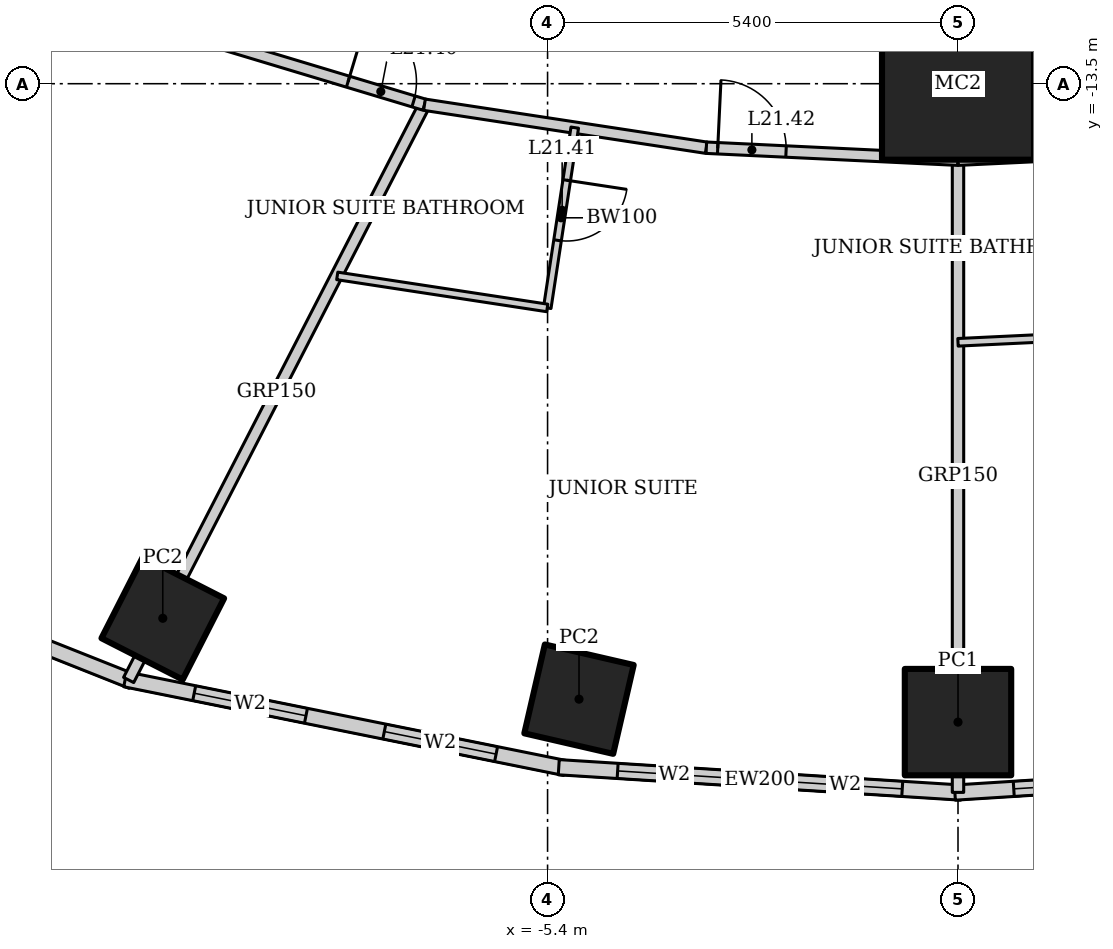
"""IFC4 building model, lengths in metres.
Left out: names, types, materials, properties, quantities, classifications, styles, units other than length and angle.
Written with IfcOpenShell. Run it as: python <this file> out.ifc"""

import sys

from ifc_helpers import new_model, si_unit, direction, frame, frame_2d, origin, origin_2d, place, context, subcontext, project, spatial, rectangle, hollow_rectangle, extrude, element, fill, save


model = new_model("IFC4")
c1 = context("Model", 3, precision=1e-05, world=origin(), true_north=direction((0.0, 1.0)))
c2 = subcontext(c1, "Body", "Model", "MODEL_VIEW")
j1 = project(units=[si_unit("LENGTHUNIT", "METRE"), si_unit("PLANEANGLEUNIT", "RADIAN")], contexts=[c1])
p1 = place(None, origin())
s1 = spatial("IfcSite", under=j1, at=p1, CompositionType="ELEMENT")
p2 = place(p1, origin())
s2 = spatial("IfcBuilding", under=s1, at=p2, CompositionType="ELEMENT")
p3 = place(p2, frame((0.0, 0.0, 91.0)))
s3 = spatial("IfcBuildingStorey", under=s2, at=p3, CompositionType="ELEMENT", Elevation=91.0)
p4 = place(p3, frame((0.0, -13.5, 0.0), z_axis=(0.0, 0.0, 1.0), x_axis=(1.0, 0.0, 0.0)))
e1 = element("IfcColumn", 1, at=p4, inside=s3, PredefinedType="COLUMN", context=c2, shape_type="SweptSolid", body=[
    extrude(hollow_rectangle(XDim=2.0, YDim=2.0, WallThickness=0.17, at=origin_2d()), origin(), (0.0, 0.0, 1.0), 3.6),
])
for number, where, z_axis, x_axis in (
    (2, (-10.463, -20.534, 0.0), (0.0, 0.0, 1.0), (0.454, 0.891, 0.0)),
    (3, (-4.986, -21.598, 0.0), (0.0, 0.0, 1.0), (0.225, 0.974, 0.0)),
):
    element("IfcColumn", number, at=place(p3, frame(where, z_axis=z_axis, x_axis=x_axis)), inside=s3, PredefinedType="COLUMN", context=c2, shape_type="SweptSolid", body=[
        extrude(hollow_rectangle(XDim=1.2, YDim=1.2, WallThickness=0.1, at=origin_2d()), origin(), (0.0, 0.0, 1.0), 3.6),
    ])
p5 = place(p3, frame((0.0, -21.9, 0.0), z_axis=(0.0, 0.0, 1.0), x_axis=(1.0, 0.0, 0.0)))
e4 = element("IfcColumn", 4, at=p5, inside=s3, PredefinedType="COLUMN", context=c2, shape_type="SweptSolid", body=[
    extrude(hollow_rectangle(XDim=1.4, YDim=1.4, WallThickness=0.1, at=origin_2d()), origin(), (0.0, 0.0, 1.0), 3.6),
])
p6 = place(p3, frame((-18.018, -18.523, 0.0), z_axis=(0.0, 0.0, 1.0), x_axis=(0.929358351251, -0.369178892895, 0.0)))
e5 = element("IfcWall", 5, at=p6, inside=s3, PredefinedType="SOLIDWALL", context=c2, shape_type="SweptSolid", body=[
    extrude(rectangle(XDim=7.692, YDim=0.2, at=frame_2d((3.846, 0.0))), origin(), (0.0, 0.0, 1.0), 3.45),
])
p7 = place(p6, frame((1.373, 0.0, 0.5)))
e6 = element("IfcOpeningElement", 6, at=p7, cuts=e5, PredefinedType="OPENING", context=c2, shape_type="SweptSolid", body=[
    extrude(rectangle(XDim=1.5, YDim=2.2, at=frame_2d((0.75, 1.1))), frame((0.0, 0.11, 0.0), z_axis=(0.0, -1.0, 0.0), x_axis=(1.0, 0.0, 0.0)), (0.0, 0.0, 1.0), 0.22),
])
p8 = place(p6, frame((4.819, 0.0, 0.5)))
e7 = element("IfcOpeningElement", 7, at=p8, cuts=e5, PredefinedType="OPENING", context=c2, shape_type="SweptSolid", body=[
    extrude(rectangle(XDim=1.5, YDim=2.2, at=frame_2d((0.75, 1.1))), frame((0.0, 0.11, 0.0), z_axis=(0.0, -1.0, 0.0), x_axis=(1.0, 0.0, 0.0)), (0.0, 0.0, 1.0), 0.22),
])
p9 = place(p3, frame((-10.957, -21.337, 0.0), z_axis=(0.0, 0.0, 1.0), x_axis=(0.980251657452, -0.197754110105, 0.0)))
e8 = element("IfcWall", 8, at=p9, inside=s3, PredefinedType="SOLIDWALL", context=c2, shape_type="SweptSolid", body=[
    extrude(rectangle(XDim=5.904, YDim=0.2, at=frame_2d((2.952, 0.0))), origin(), (0.0, 0.0, 1.0), 3.45),
])
p10 = place(p9, frame((0.926, 0.0, 0.5)))
e9 = element("IfcOpeningElement", 9, at=p10, cuts=e8, PredefinedType="OPENING", context=c2, shape_type="SweptSolid", body=[
    extrude(rectangle(XDim=1.5, YDim=2.2, at=frame_2d((0.75, 1.1))), frame((0.0, 0.11, 0.0), z_axis=(0.0, -1.0, 0.0), x_axis=(1.0, 0.0, 0.0)), (0.0, 0.0, 1.0), 0.22),
])
p11 = place(p9, frame((3.478, 0.0, 0.5)))
e10 = element("IfcOpeningElement", 10, at=p11, cuts=e8, PredefinedType="OPENING", context=c2, shape_type="SweptSolid", body=[
    extrude(rectangle(XDim=1.5, YDim=2.2, at=frame_2d((0.75, 1.1))), frame((0.0, 0.11, 0.0), z_axis=(0.0, -1.0, 0.0), x_axis=(1.0, 0.0, 0.0)), (0.0, 0.0, 1.0), 0.22),
])
p12 = place(p3, frame((-5.253, -22.493, 0.0), z_axis=(0.0, 0.0, 1.0), x_axis=(0.998018582375, -0.062919863585, 0.0)))
e11 = element("IfcWall", 11, at=p12, inside=s3, PredefinedType="SOLIDWALL", context=c2, shape_type="SweptSolid", body=[
    extrude(rectangle(XDim=5.304, YDim=0.2, at=frame_2d((2.652, 0.0))), origin(), (0.0, 0.0, 1.0), 3.45),
])
p13 = place(p12, frame((0.776, 0.0, 0.5)))
e12 = element("IfcOpeningElement", 12, at=p13, cuts=e11, PredefinedType="OPENING", context=c2, shape_type="SweptSolid", body=[
    extrude(rectangle(XDim=1.5, YDim=2.2, at=frame_2d((0.75, 1.1))), frame((0.0, 0.11, 0.0), z_axis=(0.0, -1.0, 0.0), x_axis=(1.0, 0.0, 0.0)), (0.0, 0.0, 1.0), 0.22),
])
p14 = place(p12, frame((3.028, 0.0, 0.5)))
e13 = element("IfcOpeningElement", 13, at=p14, cuts=e11, PredefinedType="OPENING", context=c2, shape_type="SweptSolid", body=[
    extrude(rectangle(XDim=1.5, YDim=2.2, at=frame_2d((0.75, 1.1))), frame((0.0, 0.11, 0.0), z_axis=(0.0, -1.0, 0.0), x_axis=(1.0, 0.0, 0.0)), (0.0, 0.0, 1.0), 0.22),
])
p15 = place(p3, frame((-0.041, -22.827, 0.0), z_axis=(0.0, 0.0, 1.0), x_axis=(0.998018582375, 0.062919863585, 0.0)))
e14 = element("IfcWall", 14, at=p15, inside=s3, PredefinedType="SOLIDWALL", context=c2, shape_type="SweptSolid", body=[
    extrude(rectangle(XDim=5.304, YDim=0.2, at=frame_2d((2.652, 0.0))), origin(), (0.0, 0.0, 1.0), 3.45),
])
p16 = place(p15, frame((0.776, 0.0, 0.5)))
e15 = element("IfcOpeningElement", 15, at=p16, cuts=e14, PredefinedType="OPENING", context=c2, shape_type="SweptSolid", body=[
    extrude(rectangle(XDim=1.5, YDim=2.2, at=frame_2d((0.75, 1.1))), frame((0.0, 0.11, 0.0), z_axis=(0.0, -1.0, 0.0), x_axis=(1.0, 0.0, 0.0)), (0.0, 0.0, 1.0), 0.22),
])
p17 = place(p15, frame((3.028, 0.0, 0.5)))
e16 = element("IfcOpeningElement", 16, at=p17, cuts=e14, PredefinedType="OPENING", context=c2, shape_type="SweptSolid", body=[
    extrude(rectangle(XDim=1.5, YDim=2.2, at=frame_2d((0.75, 1.1))), frame((0.0, 0.11, 0.0), z_axis=(0.0, -1.0, 0.0), x_axis=(1.0, 0.0, 0.0)), (0.0, 0.0, 1.0), 0.22),
])
p18 = place(p3, frame((-10.912, -21.346, 0.0), z_axis=(0.0, 0.0, 1.0), x_axis=(0.457327273085, 0.889298468059, 0.0)))
e17 = element("IfcWall", 17, at=p18, inside=s3, PredefinedType="PARTITIONING", context=c2, shape_type="SweptSolid", body=[
    extrude(rectangle(XDim=8.511, YDim=0.15, at=frame_2d((4.256, 0.0))), origin(), (0.0, 0.0, 1.0), 2.528),
])
p19 = place(p3, frame((0.0, -22.825, 0.0), z_axis=(0.0, 0.0, 1.0), x_axis=(0.0, 1.0, 0.0)))
e18 = element("IfcWall", 18, at=p19, inside=s3, PredefinedType="PARTITIONING", context=c2, shape_type="SweptSolid", body=[
    extrude(rectangle(XDim=8.325, YDim=0.15, at=frame_2d((4.162, 0.0))), origin(), (0.0, 0.0, 1.0), 2.924),
])
p20 = place(p3, frame((-11.888, -12.311, 0.0), z_axis=(0.0, 0.0, 1.0), x_axis=(0.957564241242, -0.288219922793, 0.0)))
e19 = element("IfcWall", 19, at=p20, inside=s3, PredefinedType="PARTITIONING", context=c2, shape_type="SweptSolid", body=[
    extrude(rectangle(XDim=5.085, YDim=0.15, at=frame_2d((2.542, 0.0))), origin(), (0.0, 0.0, 1.0), 3.45),
])
p21 = place(p20, frame((4.035, 0.0, 0.0)))
e20 = element("IfcOpeningElement", 20, at=p21, cuts=e19, PredefinedType="OPENING", context=c2, shape_type="SweptSolid", body=[
    extrude(rectangle(XDim=0.9, YDim=2.1, at=frame_2d((0.45, 1.05))), frame((0.0, 0.085, 0.0), z_axis=(0.0, -1.0, 0.0), x_axis=(1.0, 0.0, 0.0)), (0.0, 0.0, 1.0), 0.17),
])
p22 = place(p3, frame((-7.019, -13.776, 0.0), z_axis=(0.0, 0.0, 1.0), x_axis=(0.988564270062, -0.150800145746, 0.0)))
e21 = element("IfcWall", 21, at=p22, inside=s3, PredefinedType="PARTITIONING", context=c2, shape_type="SweptSolid", body=[
    extrude(rectangle(XDim=3.751, YDim=0.15, at=frame_2d((1.875, 0.0))), origin(), (0.0, 0.0, 1.0), 3.45),
])
p23 = place(p3, frame((-3.311, -14.342, 0.0), z_axis=(0.0, 0.0, 1.0), x_axis=(0.998863968075, -0.047652631422, 0.0)))
e22 = element("IfcWall", 22, at=p23, inside=s3, PredefinedType="PARTITIONING", context=c2, shape_type="SweptSolid", body=[
    extrude(rectangle(XDim=3.315, YDim=0.15, at=frame_2d((1.657, 0.0))), origin(), (0.0, 0.0, 1.0), 3.45),
])
p24 = place(p23, frame((0.15, 0.0, 0.0)))
e23 = element("IfcOpeningElement", 23, at=p24, cuts=e22, PredefinedType="OPENING", context=c2, shape_type="SweptSolid", body=[
    extrude(rectangle(XDim=0.9, YDim=2.1, at=frame_2d((0.45, 1.05))), frame((0.0, 0.085, 0.0), z_axis=(0.0, -1.0, 0.0), x_axis=(1.0, 0.0, 0.0)), (0.0, 0.0, 1.0), 0.17),
])
p25 = place(p3, frame((0.0, -14.5, 0.0), z_axis=(0.0, 0.0, 1.0), x_axis=(0.998863968075, 0.047652631422, 0.0)))
e24 = element("IfcWall", 24, at=p25, inside=s3, PredefinedType="PARTITIONING", context=c2, shape_type="SweptSolid", body=[
    extrude(rectangle(XDim=3.315, YDim=0.15, at=frame_2d((1.657, 0.0))), origin(), (0.0, 0.0, 1.0), 3.45),
])
p26 = place(p3, frame((-5.042, -14.078, 0.0), z_axis=(0.0, 0.0, 1.0), x_axis=(-0.150856962013, -0.988555601376, 0.0)))
e25 = element("IfcWall", 25, at=p26, inside=s3, PredefinedType="PARTITIONING", context=c2, shape_type="SweptSolid", body=[
    extrude(rectangle(XDim=2.4, YDim=0.1, at=frame_2d((1.2, 0.0))), origin(), (0.0, 0.0, 1.0), 3.45),
])
p27 = place(p26, frame((0.7, 0.0, 0.0)))
e26 = element("IfcOpeningElement", 26, at=p27, cuts=e25, PredefinedType="OPENING", context=c2, shape_type="SweptSolid", body=[
    extrude(rectangle(XDim=0.8, YDim=2.1, at=frame_2d((0.4, 1.05))), frame((0.0, 0.06, 0.0), z_axis=(0.0, -1.0, 0.0), x_axis=(1.0, 0.0, 0.0)), (0.0, 0.0, 1.0), 0.12),
])
p28 = place(p3, frame((-5.404, -16.45, 0.0), z_axis=(0.0, 0.0, 1.0), x_axis=(-0.988568792086, 0.150770498819, 0.0)))
e27 = element("IfcWall", 27, at=p28, inside=s3, PredefinedType="PARTITIONING", context=c2, shape_type="SweptSolid", body=[
    extrude(rectangle(XDim=2.795, YDim=0.1, at=frame_2d((1.397, 0.0))), origin(), (0.0, 0.0, 1.0), 3.45),
])
p29 = place(p3, frame((2.112, -16.802, 0.0), z_axis=(0.0, 0.0, 1.0), x_axis=(-0.998862383453, -0.047685835668, 0.0)))
e28 = element("IfcWall", 28, at=p29, inside=s3, PredefinedType="PARTITIONING", context=c2, shape_type="SweptSolid", body=[
    extrude(rectangle(XDim=2.115, YDim=0.1, at=frame_2d((1.057, 0.0))), origin(), (0.0, 0.0, 1.0), 3.45),
])
p30 = place(p10, origin())
e29 = element("IfcWindow", 29, at=p30, inside=s3, PartitioningType="SINGLE_PANEL", PredefinedType="WINDOW", context=c2, shape_type="SweptSolid", body=[
    extrude(rectangle(XDim=1.5, YDim=2.2, at=frame_2d((0.75, 1.1))), frame((0.0, 0.03, 0.0), z_axis=(0.0, -1.0, 0.0), x_axis=(1.0, 0.0, 0.0)), (0.0, 0.0, 1.0), 0.06),
])
fill(e9, e29)
p31 = place(p11, origin())
e30 = element("IfcWindow", 30, at=p31, inside=s3, PartitioningType="SINGLE_PANEL", PredefinedType="WINDOW", context=c2, shape_type="SweptSolid", body=[
    extrude(rectangle(XDim=1.5, YDim=2.2, at=frame_2d((0.75, 1.1))), frame((0.0, 0.03, 0.0), z_axis=(0.0, -1.0, 0.0), x_axis=(1.0, 0.0, 0.0)), (0.0, 0.0, 1.0), 0.06),
])
fill(e10, e30)
p32 = place(p13, origin())
e31 = element("IfcWindow", 31, at=p32, inside=s3, PartitioningType="SINGLE_PANEL", PredefinedType="WINDOW", context=c2, shape_type="SweptSolid", body=[
    extrude(rectangle(XDim=1.5, YDim=2.2, at=frame_2d((0.75, 1.1))), frame((0.0, 0.03, 0.0), z_axis=(0.0, -1.0, 0.0), x_axis=(1.0, 0.0, 0.0)), (0.0, 0.0, 1.0), 0.06),
])
fill(e12, e31)
p33 = place(p14, origin())
e32 = element("IfcWindow", 32, at=p33, inside=s3, PartitioningType="SINGLE_PANEL", PredefinedType="WINDOW", context=c2, shape_type="SweptSolid", body=[
    extrude(rectangle(XDim=1.5, YDim=2.2, at=frame_2d((0.75, 1.1))), frame((0.0, 0.03, 0.0), z_axis=(0.0, -1.0, 0.0), x_axis=(1.0, 0.0, 0.0)), (0.0, 0.0, 1.0), 0.06),
])
fill(e13, e32)
p34 = place(p16, origin())
e33 = element("IfcWindow", 33, at=p34, inside=s3, PartitioningType="SINGLE_PANEL", PredefinedType="WINDOW", context=c2, shape_type="SweptSolid", body=[
    extrude(rectangle(XDim=1.5, YDim=2.2, at=frame_2d((0.75, 1.1))), frame((0.0, 0.03, 0.0), z_axis=(0.0, -1.0, 0.0), x_axis=(1.0, 0.0, 0.0)), (0.0, 0.0, 1.0), 0.06),
])
fill(e15, e33)
p35 = place(p21, origin())
e34 = element("IfcDoor", 34, at=p35, inside=s3, OperationType="SINGLE_SWING_LEFT", PredefinedType="DOOR", context=c2, shape_type="SweptSolid", body=[
    extrude(rectangle(XDim=0.9, YDim=2.1, at=frame_2d((0.45, 1.05))), frame((0.0, 0.025, 0.0), z_axis=(0.0, -1.0, 0.0), x_axis=(1.0, 0.0, 0.0)), (0.0, 0.0, 1.0), 0.05),
])
fill(e20, e34)
p36 = place(p27, origin())
e35 = element("IfcDoor", 35, at=p36, inside=s3, OperationType="SINGLE_SWING_LEFT", PredefinedType="DOOR", context=c2, shape_type="SweptSolid", body=[
    extrude(rectangle(XDim=0.8, YDim=2.1, at=frame_2d((0.4, 1.05))), frame((0.0, 0.025, 0.0), z_axis=(0.0, -1.0, 0.0), x_axis=(1.0, 0.0, 0.0)), (0.0, 0.0, 1.0), 0.05),
])
fill(e26, e35)
p37 = place(p24, origin())
e36 = element("IfcDoor", 36, at=p37, inside=s3, OperationType="SINGLE_SWING_LEFT", PredefinedType="DOOR", context=c2, shape_type="SweptSolid", body=[
    extrude(rectangle(XDim=0.9, YDim=2.1, at=frame_2d((0.45, 1.05))), frame((0.0, 0.025, 0.0), z_axis=(0.0, -1.0, 0.0), x_axis=(1.0, 0.0, 0.0)), (0.0, 0.0, 1.0), 0.05),
])
fill(e23, e36)
save(model, sys.argv[1])
